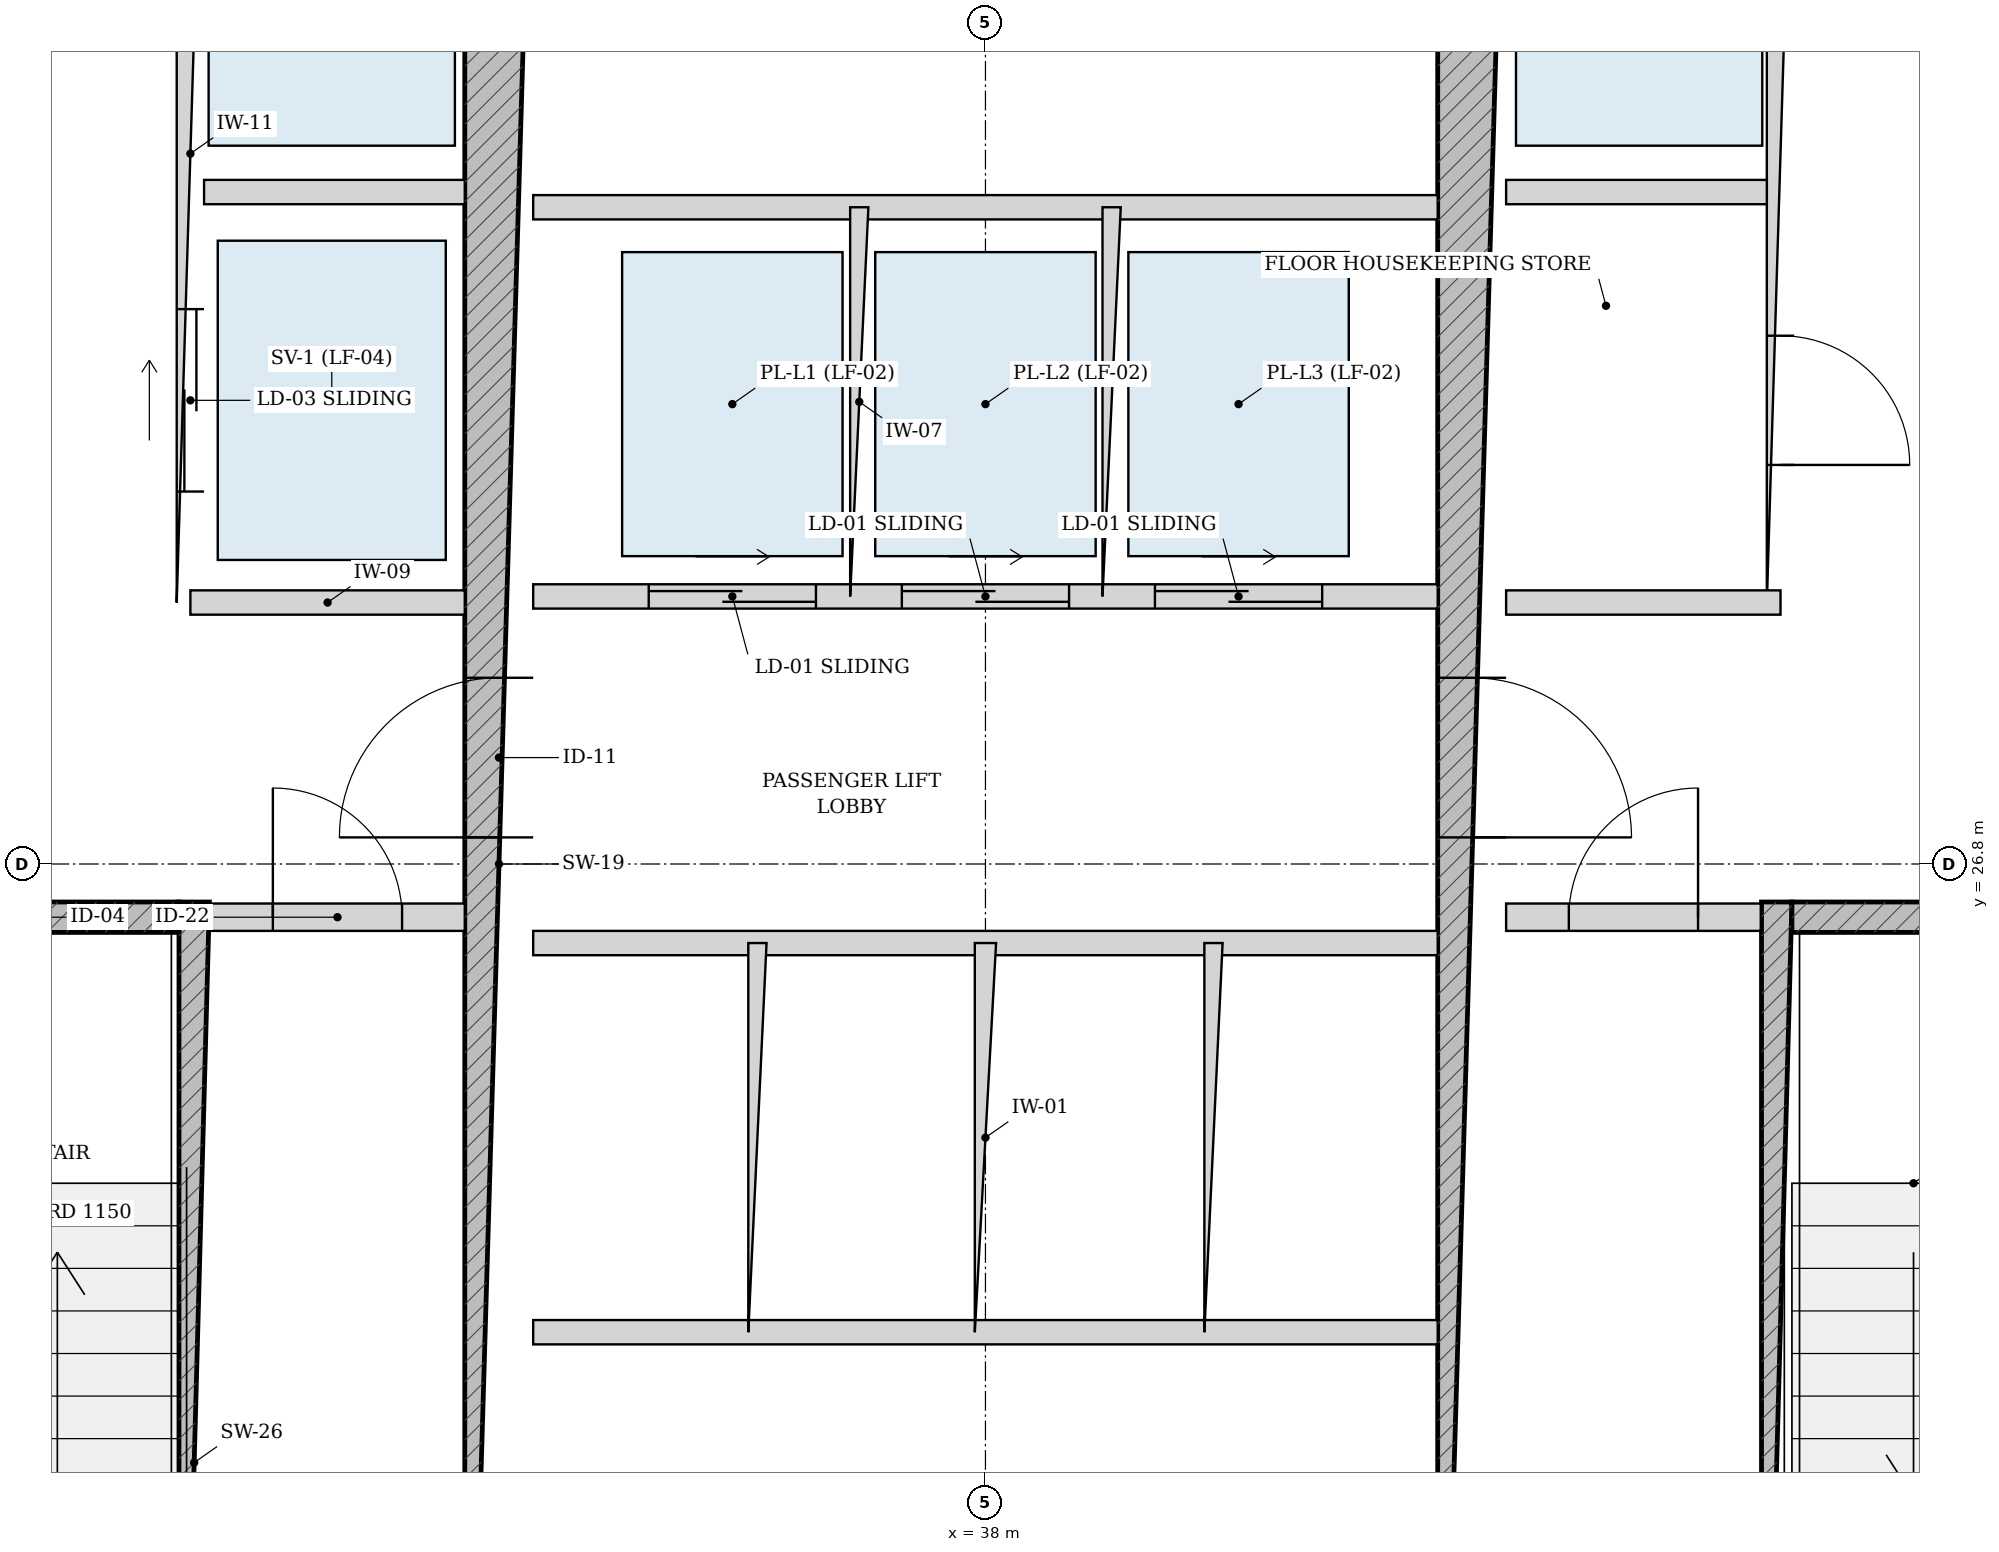
"""IFC4 building model, lengths in metres.
Left out: names, types, materials, properties, quantities, classifications, styles, units other than length and angle.
Written with IfcOpenShell. Run it as: python <this file> out.ifc"""

import sys

from ifc_helpers import new_model, si_unit, direction, frame, frame_2d, origin, place, context, subcontext, project, spatial, rectangle, extrude, source, transform, mapped, element, fill, save


model = new_model("IFC4")
c1 = context("Model", 3, precision=1e-05, world=origin(), true_north=direction((-0.2419218956, 0.970295726276)))
c2 = subcontext(c1, "Body", "Model", "MODEL_VIEW")
j1 = project(units=[si_unit("LENGTHUNIT", "METRE"), si_unit("PLANEANGLEUNIT", "RADIAN")], contexts=[c1])
p1 = place(None, origin())
s1 = spatial("IfcSite", under=j1, at=p1, CompositionType="ELEMENT")
p2 = place(p1, origin())
s2 = spatial("IfcBuilding", under=s1, at=p2, CompositionType="ELEMENT")
p3 = place(p2, frame((0.0, 0.0, 27.6)))
s3 = spatial("IfcBuildingStorey", under=s2, at=p3, CompositionType="ELEMENT", Elevation=27.6)
p4 = place(p3, frame((32.795, 19.175, 0.0), z_axis=(0.0, 0.0, 1.0), x_axis=(0.0, 1.0, 0.0)))
e1 = element("IfcWall", 1, at=p4, inside=s3, PredefinedType="SOLIDWALL", context=c2, shape_type="SweptSolid", body=[
    extrude(rectangle(XDim=7.375, YDim=0.2, at=frame_2d((3.688, 0.0))), origin(), (0.0, 0.0, 1.0), 3.32),
])
p5 = place(p3, frame((29.375, 26.45, 0.0), z_axis=(0.0, 0.0, 1.0), x_axis=(1.0, 0.0, 0.0)))
e2 = element("IfcWall", 2, at=p5, inside=s3, PredefinedType="SOLIDWALL", context=c2, shape_type="SweptSolid", body=[
    extrude(rectangle(XDim=3.32, YDim=0.2, at=frame_2d((1.66, 0.0))), origin(), (0.0, 0.0, 1.0), 3.32),
])
p6 = place(p5, frame((1.185, 0.0, 0.0)))
e3 = element("IfcOpeningElement", 3, at=p6, cuts=e2, PredefinedType="OPENING", context=c2, shape_type="SweptSolid", body=[
    extrude(rectangle(XDim=0.95, YDim=2.15, at=frame_2d((0.475, 1.075))), frame((0.0, 0.11, 0.0), z_axis=(0.0, -1.0, 0.0), x_axis=(1.0, 0.0, 0.0)), (0.0, 0.0, 1.0), 0.22),
])
p7 = place(p3, frame((43.205, 19.175, 0.0), z_axis=(0.0, 0.0, 1.0), x_axis=(0.0, 1.0, 0.0)))
e4 = element("IfcWall", 4, at=p7, inside=s3, PredefinedType="SOLIDWALL", context=c2, shape_type="SweptSolid", body=[
    extrude(rectangle(XDim=7.375, YDim=0.2, at=frame_2d((3.688, 0.0))), origin(), (0.0, 0.0, 1.0), 3.32),
])
p8 = place(p3, frame((43.305, 26.45, 0.0), z_axis=(0.0, 0.0, 1.0), x_axis=(1.0, 0.0, 0.0)))
e5 = element("IfcWall", 5, at=p8, inside=s3, PredefinedType="SOLIDWALL", context=c2, shape_type="SweptSolid", body=[
    extrude(rectangle(XDim=3.32, YDim=0.2, at=frame_2d((1.66, 0.0))), origin(), (0.0, 0.0, 1.0), 3.32),
])
p9 = place(p8, frame((1.185, 0.0, 0.0)))
e6 = element("IfcOpeningElement", 6, at=p9, cuts=e5, PredefinedType="OPENING", context=c2, shape_type="SweptSolid", body=[
    extrude(rectangle(XDim=0.95, YDim=2.15, at=frame_2d((0.475, 1.075))), frame((0.0, 0.11, 0.0), z_axis=(0.0, -1.0, 0.0), x_axis=(1.0, 0.0, 0.0)), (0.0, 0.0, 1.0), 0.22),
])
p10 = place(p3, frame((34.8, 19.175, 0.0), z_axis=(0.0, 0.0, 1.0), x_axis=(0.0, 1.0, 0.0)))
e7 = element("IfcWall", 7, at=p10, inside=s3, PredefinedType="SHEAR", context=c2, shape_type="SweptSolid", body=[
    extrude(rectangle(XDim=15.25, YDim=0.45, at=frame_2d((7.625, 0.0))), origin(), (0.0, 0.0, 1.0), 3.32),
])
p11 = place(p10, frame((7.8, 0.0, 0.0)))
e8 = element("IfcOpeningElement", 8, at=p11, cuts=e7, PredefinedType="OPENING", context=c2, shape_type="SweptSolid", body=[
    extrude(rectangle(XDim=1.05, YDim=2.15, at=frame_2d((0.525, 1.075))), frame((0.0, 0.235, 0.0), z_axis=(0.0, -1.0, 0.0), x_axis=(1.0, 0.0, 0.0)), (0.0, 0.0, 1.0), 0.47),
])
p12 = place(p3, frame((41.2, 19.175, 0.0), z_axis=(0.0, 0.0, 1.0), x_axis=(0.0, 1.0, 0.0)))
e9 = element("IfcWall", 9, at=p12, inside=s3, PredefinedType="SHEAR", context=c2, shape_type="SweptSolid", body=[
    extrude(rectangle(XDim=15.25, YDim=0.45, at=frame_2d((7.625, 0.0))), origin(), (0.0, 0.0, 1.0), 3.32),
])
p13 = place(p12, frame((7.8, 0.0, 0.0)))
e10 = element("IfcOpeningElement", 10, at=p13, cuts=e9, PredefinedType="OPENING", context=c2, shape_type="SweptSolid", body=[
    extrude(rectangle(XDim=1.05, YDim=2.15, at=frame_2d((0.525, 1.075))), frame((0.0, 0.235, 0.0), z_axis=(0.0, -1.0, 0.0), x_axis=(1.0, 0.0, 0.0)), (0.0, 0.0, 1.0), 0.47),
])
p14 = place(p3, frame((32.9, 26.45, 0.0), z_axis=(0.0, 0.0, 1.0), x_axis=(1.0, 0.0, 0.0)))
e11 = element("IfcWall", 11, at=p14, inside=s3, PredefinedType="PARTITIONING", context=c2, shape_type="SweptSolid", body=[
    extrude(rectangle(XDim=1.675, YDim=0.18, at=frame_2d((0.837, 0.0))), origin(), (0.0, 0.0, 1.0), 3.32),
])
p15 = place(p14, frame((0.413, 0.0, 0.0)))
e12 = element("IfcOpeningElement", 12, at=p15, cuts=e11, PredefinedType="OPENING", context=c2, shape_type="SweptSolid", body=[
    extrude(rectangle(XDim=0.85, YDim=2.1, at=frame_2d((0.425, 1.05))), frame((0.0, 0.1, 0.0), z_axis=(0.0, -1.0, 0.0), x_axis=(1.0, 0.0, 0.0)), (0.0, 0.0, 1.0), 0.2),
])
p16 = place(p3, frame((41.425, 26.45, 0.0), z_axis=(0.0, 0.0, 1.0), x_axis=(1.0, 0.0, 0.0)))
e13 = element("IfcWall", 13, at=p16, inside=s3, PredefinedType="PARTITIONING", context=c2, shape_type="SweptSolid", body=[
    extrude(rectangle(XDim=1.675, YDim=0.18, at=frame_2d((0.837, 0.0))), origin(), (0.0, 0.0, 1.0), 3.32),
])
p17 = place(p16, frame((0.413, 0.0, 0.0)))
e14 = element("IfcOpeningElement", 14, at=p17, cuts=e13, PredefinedType="OPENING", context=c2, shape_type="SweptSolid", body=[
    extrude(rectangle(XDim=0.85, YDim=2.1, at=frame_2d((0.425, 1.05))), frame((0.0, 0.1, 0.0), z_axis=(0.0, -1.0, 0.0), x_axis=(1.0, 0.0, 0.0)), (0.0, 0.0, 1.0), 0.2),
])
p18 = place(p3, frame((32.77, 28.52, 0.0), z_axis=(0.0, 0.0, 1.0), x_axis=(0.0, 1.0, 0.0)))
e15 = element("IfcWall", 15, at=p18, inside=s3, PredefinedType="PARTITIONING", context=c2, shape_type="SweptSolid", body=[
    extrude(rectangle(XDim=5.905, YDim=0.18, at=frame_2d((2.953, 0.0))), origin(), (0.0, 0.0, 1.0), 3.32),
])
p19 = place(p18, frame((3.655, 0.0, 0.0)))
e16 = element("IfcOpeningElement", 16, at=p19, cuts=e15, PredefinedType="OPENING", context=c2, shape_type="SweptSolid", body=[
    extrude(rectangle(XDim=1.15, YDim=2.2, at=frame_2d((0.575, 1.1))), frame((0.0, 0.1, 0.0), z_axis=(0.0, -1.0, 0.0), x_axis=(1.0, 0.0, 0.0)), (0.0, 0.0, 1.0), 0.2),
])
p20 = place(p18, frame((0.73, 0.0, 0.0)))
e17 = element("IfcOpeningElement", 17, at=p20, cuts=e15, PredefinedType="OPENING", context=c2, shape_type="SweptSolid", body=[
    extrude(rectangle(XDim=1.2, YDim=2.25, at=frame_2d((0.6, 1.125))), frame((0.0, 0.1, 0.0), z_axis=(0.0, -1.0, 0.0), x_axis=(1.0, 0.0, 0.0)), (0.0, 0.0, 1.0), 0.2),
])
p21 = place(p3, frame((32.86, 31.22, 0.0), z_axis=(0.0, 0.0, 1.0), x_axis=(1.0, 0.0, 0.0)))
e18 = element("IfcWall", 18, at=p21, inside=s3, PredefinedType="PARTITIONING", context=c2, shape_type="SweptSolid", body=[
    extrude(rectangle(XDim=1.715, YDim=0.16, at=frame_2d((0.857, 0.0))), origin(), (0.0, 0.0, 1.0), 3.32),
])
p22 = place(p3, frame((32.77, 28.52, 0.0), z_axis=(0.0, 0.0, 1.0), x_axis=(1.0, 0.0, 0.0)))
e19 = element("IfcWall", 19, at=p22, inside=s3, PredefinedType="PARTITIONING", context=c2, shape_type="SweptSolid", body=[
    extrude(rectangle(XDim=1.805, YDim=0.16, at=frame_2d((0.902, 0.0))), origin(), (0.0, 0.0, 1.0), 3.32),
])
p23 = place(p3, frame((43.23, 28.52, 0.0), z_axis=(0.0, 0.0, 1.0), x_axis=(0.0, 1.0, 0.0)))
e20 = element("IfcWall", 20, at=p23, inside=s3, PredefinedType="PARTITIONING", context=c2, shape_type="SweptSolid", body=[
    extrude(rectangle(XDim=5.905, YDim=0.18, at=frame_2d((2.953, 0.0))), origin(), (0.0, 0.0, 1.0), 3.32),
])
p24 = place(p23, frame((0.905, 0.0, 0.0)))
e21 = element("IfcOpeningElement", 21, at=p24, cuts=e20, PredefinedType="OPENING", context=c2, shape_type="SweptSolid", body=[
    extrude(rectangle(XDim=0.85, YDim=2.1, at=frame_2d((0.425, 1.05))), frame((0.0, 0.1, 0.0), z_axis=(0.0, -1.0, 0.0), x_axis=(1.0, 0.0, 0.0)), (0.0, 0.0, 1.0), 0.2),
])
p25 = place(p23, frame((3.655, 0.0, 0.0)))
e22 = element("IfcOpeningElement", 22, at=p25, cuts=e20, PredefinedType="OPENING", context=c2, shape_type="SweptSolid", body=[
    extrude(rectangle(XDim=1.15, YDim=2.2, at=frame_2d((0.575, 1.1))), frame((0.0, 0.1, 0.0), z_axis=(0.0, -1.0, 0.0), x_axis=(1.0, 0.0, 0.0)), (0.0, 0.0, 1.0), 0.2),
])
p26 = place(p3, frame((41.425, 31.22, 0.0), z_axis=(0.0, 0.0, 1.0), x_axis=(1.0, 0.0, 0.0)))
e23 = element("IfcWall", 23, at=p26, inside=s3, PredefinedType="PARTITIONING", context=c2, shape_type="SweptSolid", body=[
    extrude(rectangle(XDim=1.715, YDim=0.16, at=frame_2d((0.857, 0.0))), origin(), (0.0, 0.0, 1.0), 3.32),
])
p27 = place(p3, frame((41.425, 28.52, 0.0), z_axis=(0.0, 0.0, 1.0), x_axis=(1.0, 0.0, 0.0)))
e24 = element("IfcWall", 24, at=p27, inside=s3, PredefinedType="PARTITIONING", context=c2, shape_type="SweptSolid", body=[
    extrude(rectangle(XDim=1.805, YDim=0.16, at=frame_2d((0.902, 0.0))), origin(), (0.0, 0.0, 1.0), 3.32),
])
p28 = place(p3, frame((35.025, 28.56, 0.0), z_axis=(0.0, 0.0, 1.0), x_axis=(1.0, 0.0, 0.0)))
e25 = element("IfcWall", 25, at=p28, inside=s3, PredefinedType="PARTITIONING", context=c2, shape_type="SweptSolid", body=[
    extrude(rectangle(XDim=5.95, YDim=0.16, at=frame_2d((2.975, 0.0))), origin(), (0.0, 0.0, 1.0), 3.32),
])
p29 = place(p28, frame((0.76, 0.0, 0.0)))
e26 = element("IfcOpeningElement", 26, at=p29, cuts=e25, PredefinedType="OPENING", context=c2, shape_type="SweptSolid", body=[
    extrude(rectangle(XDim=1.1, YDim=2.2, at=frame_2d((0.55, 1.1))), frame((0.0, 0.09, 0.0), z_axis=(0.0, -1.0, 0.0), x_axis=(1.0, 0.0, 0.0)), (0.0, 0.0, 1.0), 0.18),
])
p30 = place(p28, frame((2.425, 0.0, 0.0)))
e27 = element("IfcOpeningElement", 27, at=p30, cuts=e25, PredefinedType="OPENING", context=c2, shape_type="SweptSolid", body=[
    extrude(rectangle(XDim=1.1, YDim=2.2, at=frame_2d((0.55, 1.1))), frame((0.0, 0.09, 0.0), z_axis=(0.0, -1.0, 0.0), x_axis=(1.0, 0.0, 0.0)), (0.0, 0.0, 1.0), 0.18),
])
p31 = place(p28, frame((4.09, 0.0, 0.0)))
e28 = element("IfcOpeningElement", 28, at=p31, cuts=e25, PredefinedType="OPENING", context=c2, shape_type="SweptSolid", body=[
    extrude(rectangle(XDim=1.1, YDim=2.2, at=frame_2d((0.55, 1.1))), frame((0.0, 0.09, 0.0), z_axis=(0.0, -1.0, 0.0), x_axis=(1.0, 0.0, 0.0)), (0.0, 0.0, 1.0), 0.18),
])
p32 = place(p3, frame((35.025, 31.12, 0.0), z_axis=(0.0, 0.0, 1.0), x_axis=(1.0, 0.0, 0.0)))
e29 = element("IfcWall", 29, at=p32, inside=s3, PredefinedType="PARTITIONING", context=c2, shape_type="SweptSolid", body=[
    extrude(rectangle(XDim=5.95, YDim=0.16, at=frame_2d((2.975, 0.0))), origin(), (0.0, 0.0, 1.0), 3.32),
])
for number, where, z_axis, x_axis in (
    (30, (37.17, 28.56, 0.0), (0.0, 0.0, 1.0), (0.0, 1.0, 0.0)),
    (31, (38.83, 28.56, 0.0), (0.0, 0.0, 1.0), (0.0, 1.0, 0.0)),
):
    element("IfcWall", number, at=place(p3, frame(where, z_axis=z_axis, x_axis=x_axis)), inside=s3, PredefinedType="PARTITIONING", context=c2, shape_type="SweptSolid", body=[
        extrude(rectangle(XDim=2.56, YDim=0.12, at=frame_2d((1.28, 0.0))), origin(), (0.0, 0.0, 1.0), 3.32),
    ])
for number, where, z_axis, x_axis in (
    (32, (35.025, 26.28, 0.0), (0.0, 0.0, 1.0), (1.0, 0.0, 0.0)),
    (33, (35.025, 23.72, 0.0), (0.0, 0.0, 1.0), (1.0, 0.0, 0.0)),
):
    element("IfcWall", number, at=place(p3, frame(where, z_axis=z_axis, x_axis=x_axis)), inside=s3, PredefinedType="PARTITIONING", context=c2, shape_type="SweptSolid", body=[
        extrude(rectangle(XDim=5.95, YDim=0.16, at=frame_2d((2.975, 0.0))), origin(), (0.0, 0.0, 1.0), 3.32),
    ])
p33 = place(p3, frame((36.5, 23.72, 0.0), z_axis=(0.0, 0.0, 1.0), x_axis=(0.0, 1.0, 0.0)))
e34 = element("IfcWall", 34, at=p33, inside=s3, PredefinedType="PARTITIONING", context=c2, shape_type="SweptSolid", body=[
    extrude(rectangle(XDim=2.56, YDim=0.12, at=frame_2d((1.28, 0.0))), origin(), (0.0, 0.0, 1.0), 3.32),
])
p34 = place(p3, frame((38.0, 23.72, 0.0), z_axis=(0.0, 0.0, 1.0), x_axis=(0.0, 1.0, 0.0)))
e35 = element("IfcWall", 35, at=p34, inside=s3, PredefinedType="PARTITIONING", context=c2, shape_type="SweptSolid", body=[
    extrude(rectangle(XDim=2.56, YDim=0.14, at=frame_2d((1.28, 0.0))), origin(), (0.0, 0.0, 1.0), 3.32),
])
p35 = place(p3, frame((39.5, 23.72, 0.0), z_axis=(0.0, 0.0, 1.0), x_axis=(0.0, 1.0, 0.0)))
e36 = element("IfcWall", 36, at=p35, inside=s3, PredefinedType="PARTITIONING", context=c2, shape_type="SweptSolid", body=[
    extrude(rectangle(XDim=2.56, YDim=0.12, at=frame_2d((1.28, 0.0))), origin(), (0.0, 0.0, 1.0), 3.32),
])
m1 = source(origin(), c2, "Body", "SweptSolid", [
    extrude(rectangle(XDim=1.05, YDim=2.15, at=frame_2d((0.525, 1.075))), frame((0.0, 0.025, 0.0), z_axis=(0.0, -1.0, 0.0), x_axis=(1.0, 0.0, 0.0)), (0.0, 0.0, 1.0), 0.05),
])
p36 = place(p11, origin())
e37 = element("IfcDoor", 37, at=p36, inside=s3, OperationType="SINGLE_SWING_LEFT", PredefinedType="DOOR", context=c2, shape_type="MappedRepresentation", body=[
    mapped(m1, transform((0.0, 0.0, 0.0), scale=1.0)),
])
fill(e8, e37)
p37 = place(p13, frame((1.05, 0.0, 0.0), z_axis=(0.0, 0.0, 1.0), x_axis=(-1.0, 0.0, 0.0)))
e38 = element("IfcDoor", 38, at=p37, inside=s3, OperationType="SINGLE_SWING_RIGHT", PredefinedType="DOOR", context=c2, shape_type="MappedRepresentation", body=[
    mapped(m1, transform((0.0, 0.0, 0.0), scale=1.0)),
])
fill(e10, e38)
m2 = source(origin(), c2, "Body", "SweptSolid", [
    extrude(rectangle(XDim=0.85, YDim=2.1, at=frame_2d((0.425, 1.05))), frame((0.0, 0.025, 0.0), z_axis=(0.0, -1.0, 0.0), x_axis=(1.0, 0.0, 0.0)), (0.0, 0.0, 1.0), 0.05),
])
p38 = place(p15, origin())
e39 = element("IfcDoor", 39, at=p38, inside=s3, OperationType="SINGLE_SWING_LEFT", PredefinedType="DOOR", context=c2, shape_type="MappedRepresentation", body=[
    mapped(m2, transform((0.0, 0.0, 0.0), scale=1.0)),
])
fill(e12, e39)
p39 = place(p17, origin())
e40 = element("IfcDoor", 40, at=p39, inside=s3, OperationType="SINGLE_SWING_RIGHT", PredefinedType="DOOR", context=c2, shape_type="MappedRepresentation", body=[
    mapped(m2, transform((0.0, 0.0, 0.0), scale=1.0)),
])
fill(e14, e40)
p40 = place(p24, frame((0.85, 0.0, 0.0), z_axis=(0.0, 0.0, 1.0), x_axis=(-1.0, 0.0, 0.0)))
e41 = element("IfcDoor", 41, at=p40, inside=s3, OperationType="SINGLE_SWING_RIGHT", PredefinedType="DOOR", context=c2, shape_type="MappedRepresentation", body=[
    mapped(m2, transform((0.0, 0.0, 0.0), scale=1.0)),
])
fill(e21, e41)
m3 = source(origin(), c2, "Body", "SweptSolid", [
    extrude(rectangle(XDim=1.2, YDim=2.25, at=frame_2d((0.6, 1.125))), frame((0.0, 0.025, 0.0), z_axis=(0.0, -1.0, 0.0), x_axis=(1.0, 0.0, 0.0)), (0.0, 0.0, 1.0), 0.05),
])
p41 = place(p20, origin())
e42 = element("IfcDoor", 42, at=p41, inside=s3, OperationType="DOUBLE_DOOR_SLIDING", PredefinedType="DOOR", context=c2, shape_type="MappedRepresentation", body=[
    mapped(m3, transform((0.0, 0.0, 0.0), scale=1.0)),
])
fill(e17, e42)
m4 = source(origin(), c2, "Body", "SweptSolid", [
    extrude(rectangle(XDim=1.1, YDim=2.2, at=frame_2d((0.55, 1.1))), frame((0.0, 0.025, 0.0), z_axis=(0.0, -1.0, 0.0), x_axis=(1.0, 0.0, 0.0)), (0.0, 0.0, 1.0), 0.05),
])
p42 = place(p29, origin())
e43 = element("IfcDoor", 43, at=p42, inside=s3, OperationType="DOUBLE_DOOR_SLIDING", PredefinedType="DOOR", context=c2, shape_type="MappedRepresentation", body=[
    mapped(m4, transform((0.0, 0.0, 0.0), scale=1.0)),
])
fill(e26, e43)
p43 = place(p30, origin())
e44 = element("IfcDoor", 44, at=p43, inside=s3, OperationType="DOUBLE_DOOR_SLIDING", PredefinedType="DOOR", context=c2, shape_type="MappedRepresentation", body=[
    mapped(m4, transform((0.0, 0.0, 0.0), scale=1.0)),
])
fill(e27, e44)
p44 = place(p31, origin())
e45 = element("IfcDoor", 45, at=p44, inside=s3, OperationType="DOUBLE_DOOR_SLIDING", PredefinedType="DOOR", context=c2, shape_type="MappedRepresentation", body=[
    mapped(m4, transform((0.0, 0.0, 0.0), scale=1.0)),
])
fill(e28, e45)
save(model, sys.argv[1])
